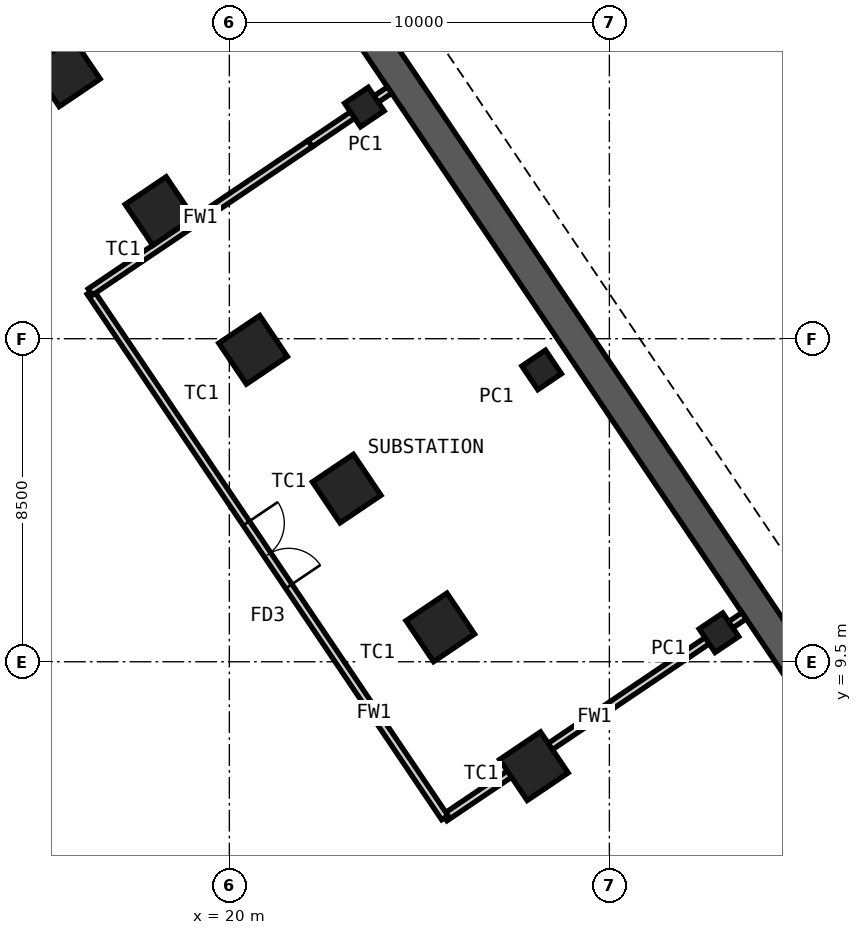
"""IFC4 building model, lengths in metres.
Left out: names, types, materials, properties, quantities, classifications, styles, units other than length and angle.
Written with IfcOpenShell. Run it as: python <this file> out.ifc"""

import sys

from ifc_helpers import new_model, si_unit, direction, frame, frame_2d, origin, origin_2d, place, context, subcontext, project, spatial, rectangle, hollow_rectangle, extrude, element, fill, save


model = new_model("IFC4")
c1 = context("Model", 3, precision=1e-05, world=origin(), true_north=direction((0.0, 1.0)))
c2 = subcontext(c1, "Body", "Model", "MODEL_VIEW")
j1 = project(units=[si_unit("LENGTHUNIT", "METRE"), si_unit("PLANEANGLEUNIT", "RADIAN")], contexts=[c1])
p1 = place(None, origin())
s1 = spatial("IfcSite", under=j1, at=p1, CompositionType="ELEMENT")
p2 = place(p1, origin())
s2 = spatial("IfcBuilding", under=s1, at=p2, CompositionType="ELEMENT")
p3 = place(p2, frame((0.0, 0.0, -12.0)))
s3 = spatial("IfcBuildingStorey", under=s2, at=p3, CompositionType="ELEMENT", Elevation=-12.0)
p4 = place(p3, frame((19.527, 32.21, -0.2), z_axis=(0.0, 0.0, 1.0), x_axis=(0.559192197891, -0.829038048474, 0.0)))
e1 = element("IfcWall", 1, at=p4, inside=s3, PredefinedType="SHEAR", context=c2, shape_type="SweptSolid", body=[
    extrude(rectangle(XDim=34.755, YDim=0.8, at=frame_2d((17.377, 0.0))), origin(), (0.0, 0.0, 1.0), 6.2),
])
for number, where, z_axis, x_axis in (
    (2, (15.698, 25.01, -0.2), (0.0, 0.0, 1.0), (-0.559, 0.829, 0.0)),
    (3, (18.161, 21.359, -0.2), (0.0, 0.0, 1.0), (-0.559, 0.829, 0.0)),
    (4, (20.624, 17.707, -0.2), (0.0, 0.0, 1.0), (-0.559, 0.829, 0.0)),
    (5, (23.087, 14.056, -0.2), (0.0, 0.0, 1.0), (-0.559, 0.829, 0.0)),
    (6, (25.55, 10.404, -0.2), (0.0, 0.0, 1.0), (-0.559, 0.829, 0.0)),
    (7, (28.013, 6.752, -0.2), (0.0, 0.0, 1.0), (-0.559, 0.829, 0.0)),
):
    element("IfcColumn", number, at=place(p3, frame(where, z_axis=z_axis, x_axis=x_axis)), inside=s3, PredefinedType="COLUMN", context=c2, shape_type="SweptSolid", body=[
        extrude(hollow_rectangle(XDim=1.3, YDim=1.3, WallThickness=0.1, at=origin_2d()), origin(), (0.0, 0.0, 1.0), 6.2),
    ])
for number, where, z_axis, x_axis in (
    (8, (23.553, 24.095, -0.2), (0.0, 0.0, 1.0), (-0.559, 0.829, 0.0)),
    (9, (28.218, 17.179, -0.2), (0.0, 0.0, 1.0), (-0.559, 0.829, 0.0)),
    (10, (32.883, 10.263, -0.2), (0.0, 0.0, 1.0), (-0.559, 0.829, 0.0)),
):
    element("IfcColumn", number, at=place(p3, frame(where, z_axis=z_axis, x_axis=x_axis)), inside=s3, PredefinedType="COLUMN", context=c2, shape_type="SweptSolid", body=[
        extrude(hollow_rectangle(XDim=0.75, YDim=0.75, WallThickness=0.036, at=origin_2d()), origin(), (0.0, 0.0, 1.0), 6.2),
    ])
p5 = place(p3, frame((24.216, 24.542, 0.0), z_axis=(0.0, 0.0, 1.0), x_axis=(-0.829001192095, -0.559246835937, 0.0)))
e11 = element("IfcWall", 11, at=p5, inside=s3, PredefinedType="PARTITIONING", context=c2, shape_type="SweptSolid", body=[
    extrude(rectangle(XDim=0.779, YDim=0.2, at=frame_2d((0.39, 0.0))), origin(), (0.0, 0.0, 1.0), 5.75),
])
p6 = place(p3, frame((33.546, 10.711, 0.0), z_axis=(0.0, 0.0, 1.0), x_axis=(-0.829037218051, -0.559193429045, 0.0)))
e12 = element("IfcWall", 12, at=p6, inside=s3, PredefinedType="PARTITIONING", context=c2, shape_type="SweptSolid", body=[
    extrude(rectangle(XDim=9.5, YDim=0.2, at=frame_2d((4.75, 0.0))), origin(), (0.0, 0.0, 1.0), 5.75),
])
p7 = place(p3, frame((16.341, 19.23, 0.0), z_axis=(0.0, 0.0, 1.0), x_axis=(0.559193597406, -0.829037104489, 0.0)))
e13 = element("IfcWall", 13, at=p7, inside=s3, PredefinedType="PARTITIONING", context=c2, shape_type="SweptSolid", body=[
    extrude(rectangle(XDim=16.684, YDim=0.2, at=frame_2d((8.342, 0.0))), origin(), (0.0, 0.0, 1.0), 5.75),
])
p8 = place(p7, frame((7.342, 0.0, 0.0)))
e14 = element("IfcOpeningElement", 14, at=p8, cuts=e13, PredefinedType="OPENING", context=c2, shape_type="SweptSolid", body=[
    extrude(rectangle(XDim=2.0, YDim=2.4, at=frame_2d((1.0, 1.2))), frame((0.0, 0.11, 0.0), z_axis=(0.0, -1.0, 0.0), x_axis=(1.0, 0.0, 0.0)), (0.0, 0.0, 1.0), 0.22),
])
p9 = place(p3, frame((23.57, 24.106, 0.0), z_axis=(0.0, 0.0, 1.0), x_axis=(-0.829087224141, -0.559119284917, 0.0)))
e15 = element("IfcWall", 15, at=p9, inside=s3, PredefinedType="PARTITIONING", context=c2, shape_type="SweptSolid", body=[
    extrude(rectangle(XDim=1.744, YDim=0.2, at=frame_2d((0.872, 0.0))), origin(), (0.0, 0.0, 1.0), 4.65),
])
p10 = place(p3, frame((22.125, 23.131, 0.0), z_axis=(0.0, 0.0, 1.0), x_axis=(-0.829028744145, -0.559205991904, 0.0)))
e16 = element("IfcWall", 16, at=p10, inside=s3, PredefinedType="PARTITIONING", context=c2, shape_type="SweptSolid", body=[
    extrude(rectangle(XDim=6.977, YDim=0.2, at=frame_2d((3.489, 0.0))), origin(), (0.0, 0.0, 1.0), 5.75),
])
p11 = place(p8, origin())
e17 = element("IfcDoor", 17, at=p11, inside=s3, OperationType="DOUBLE_DOOR_DOUBLE_SWING", PredefinedType="DOOR", context=c2, shape_type="SweptSolid", body=[
    extrude(rectangle(XDim=2.0, YDim=2.4, at=frame_2d((1.0, 1.2))), frame((0.0, 0.025, 0.0), z_axis=(0.0, -1.0, 0.0), x_axis=(1.0, 0.0, 0.0)), (0.0, 0.0, 1.0), 0.05),
])
fill(e14, e17)
save(model, sys.argv[1])
